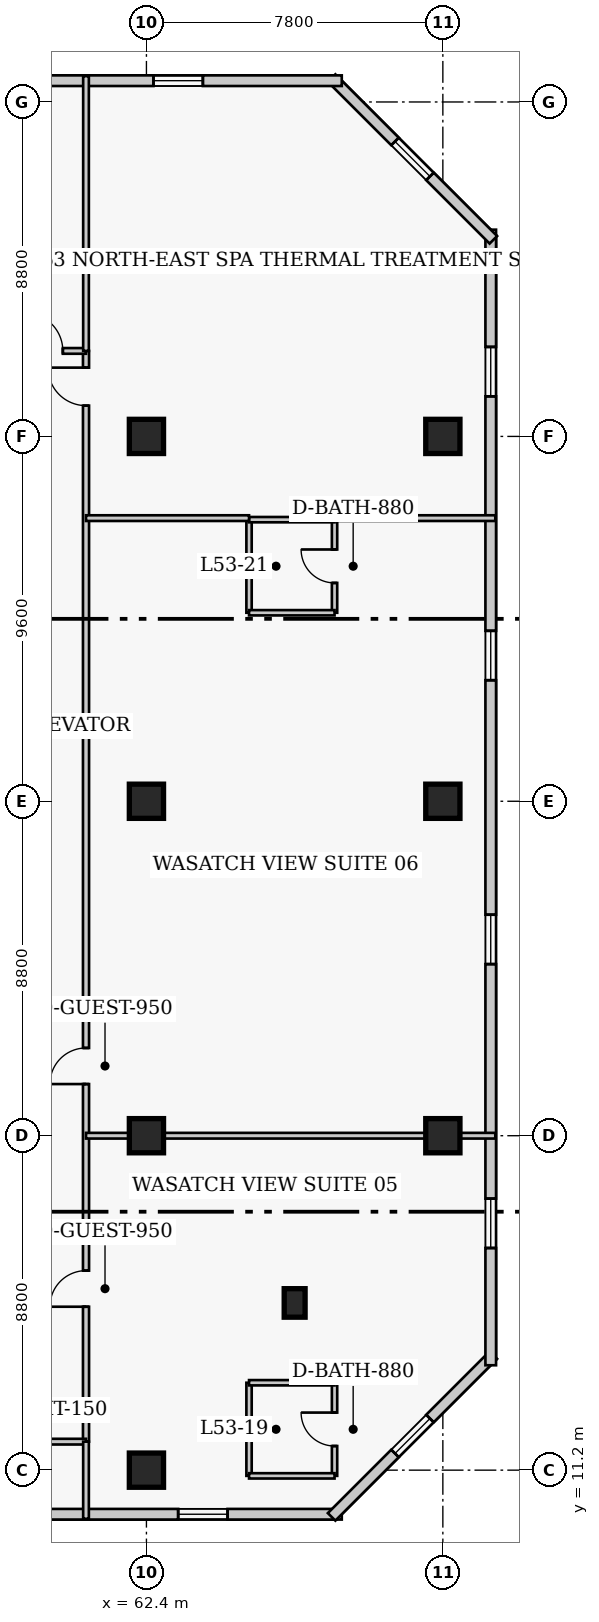
"""IFC4 building model, lengths in metres.
Left out: names, types, materials, properties, quantities, classifications, styles, units other than length and angle.
Written with IfcOpenShell. Run it as: python <this file> out.ifc"""

import sys

from ifc_helpers import new_model, si_unit, direction, frame, frame_2d, origin, origin_2d, place, context, subcontext, project, spatial, rectangle, extrude, element, fill, save


model = new_model("IFC4")
c1 = context("Model", 3, precision=1e-05, world=origin(), true_north=direction((0.0, 1.0)))
c2 = subcontext(c1, "Body", "Model", "MODEL_VIEW")
j1 = project(units=[si_unit("LENGTHUNIT", "METRE"), si_unit("PLANEANGLEUNIT", "RADIAN")], contexts=[c1])
p1 = place(None, origin())
s1 = spatial("IfcSite", under=j1, at=p1, CompositionType="ELEMENT")
p2 = place(p1, origin())
s2 = spatial("IfcBuilding", under=s1, at=p2, CompositionType="ELEMENT")
p3 = place(p2, frame((0.0, 0.0, 212.4)))
s3 = spatial("IfcBuildingStorey", under=s2, at=p3, CompositionType="ELEMENT", Elevation=212.4)
for number, where, z_axis, x_axis in (
    (1, (62.4, 11.2, 0.0), (0.0, 0.0, 1.0), (1.0, 0.0, 0.0)),
    (2, (62.4, 20.0, 0.0), (0.0, 0.0, 1.0), (1.0, 0.0, 0.0)),
    (3, (62.4, 28.8, 0.0), (0.0, 0.0, 1.0), (1.0, 0.0, 0.0)),
    (4, (62.4, 38.4, 0.0), (0.0, 0.0, 1.0), (1.0, 0.0, 0.0)),
    (5, (70.2, 20.0, 0.0), (0.0, 0.0, 1.0), (1.0, 0.0, 0.0)),
    (6, (70.2, 28.8, 0.0), (0.0, 0.0, 1.0), (1.0, 0.0, 0.0)),
    (7, (70.2, 38.4, 0.0), (0.0, 0.0, 1.0), (1.0, 0.0, 0.0)),
):
    element("IfcColumn", number, at=place(p3, frame(where, z_axis=z_axis, x_axis=x_axis)), inside=s3, PredefinedType="COLUMN", context=c2, shape_type="SweptSolid", body=[
        extrude(rectangle(XDim=0.9, YDim=0.9, at=origin_2d()), origin(), (0.0, 0.0, 1.0), 3.9),
    ])
p4 = place(p3, frame((66.3, 15.6, 0.0), z_axis=(0.0, 0.0, 1.0), x_axis=(1.0, 0.0, 0.0)))
e8 = element("IfcColumn", 8, at=p4, inside=s3, PredefinedType="PILASTER", context=c2, shape_type="SweptSolid", body=[
    extrude(rectangle(XDim=0.55, YDim=0.75, at=origin_2d()), origin(), (0.0, 0.0, 1.0), 3.9),
])
p5 = place(p3, frame((41.71, 10.04, 0.0), z_axis=(0.0, 0.0, 1.0), x_axis=(1.0, 0.0, 0.0)))
e9 = element("IfcWall", 9, at=p5, inside=s3, PredefinedType="SOLIDWALL", context=c2, shape_type="SweptSolid", body=[
    extrude(rectangle(XDim=25.83, YDim=0.28, at=frame_2d((12.915, 0.0))), origin(), (0.0, 0.0, 1.0), 3.65),
])
p6 = place(p5, frame((3.005, 0.0, 0.85)))
e10 = element("IfcOpeningElement", 10, at=p6, cuts=e9, PredefinedType="OPENING", context=c2, shape_type="SweptSolid", body=[
    extrude(rectangle(XDim=1.3, YDim=1.7, at=frame_2d((0.65, 0.85))), frame((0.0, 0.15, 0.0), z_axis=(0.0, -1.0, 0.0), x_axis=(1.0, 0.0, 0.0)), (0.0, 0.0, 1.0), 0.3),
])
p7 = place(p5, frame((13.415, 0.0, 0.85)))
e11 = element("IfcOpeningElement", 11, at=p7, cuts=e9, PredefinedType="OPENING", context=c2, shape_type="SweptSolid", body=[
    extrude(rectangle(XDim=1.3, YDim=1.7, at=frame_2d((0.65, 0.85))), frame((0.0, 0.15, 0.0), z_axis=(0.0, -1.0, 0.0), x_axis=(1.0, 0.0, 0.0)), (0.0, 0.0, 1.0), 0.3),
])
p8 = place(p5, frame((21.525, 0.0, 0.85)))
e12 = element("IfcOpeningElement", 12, at=p8, cuts=e9, PredefinedType="OPENING", context=c2, shape_type="SweptSolid", body=[
    extrude(rectangle(XDim=1.3, YDim=1.7, at=frame_2d((0.65, 0.85))), frame((0.0, 0.15, 0.0), z_axis=(0.0, -1.0, 0.0), x_axis=(1.0, 0.0, 0.0)), (0.0, 0.0, 1.0), 0.3),
])
p9 = place(p3, frame((67.273, 9.971, 0.0), z_axis=(0.0, 0.0, 1.0), x_axis=(0.707106781187, 0.707106781187, 0.0)))
e13 = element("IfcWall", 13, at=p9, inside=s3, PredefinedType="SOLIDWALL", context=c2, shape_type="SweptSolid", body=[
    extrude(rectangle(XDim=6.02, YDim=0.28, at=frame_2d((3.01, 0.0))), origin(), (0.0, 0.0, 1.0), 3.65),
])
p10 = place(p9, frame((2.36, 0.0, 0.85)))
e14 = element("IfcOpeningElement", 14, at=p10, cuts=e13, PredefinedType="OPENING", context=c2, shape_type="SweptSolid", body=[
    extrude(rectangle(XDim=1.3, YDim=1.7, at=frame_2d((0.65, 0.85))), frame((0.0, 0.15, 0.0), z_axis=(0.0, -1.0, 0.0), x_axis=(1.0, 0.0, 0.0)), (0.0, 0.0, 1.0), 0.3),
])
p11 = place(p3, frame((71.46, 13.96, 0.0), z_axis=(0.0, 0.0, 1.0), x_axis=(0.0, 1.0, 0.0)))
e15 = element("IfcWall", 15, at=p11, inside=s3, PredefinedType="SOLIDWALL", context=c2, shape_type="SweptSolid", body=[
    extrude(rectangle(XDim=29.88, YDim=0.28, at=frame_2d((14.94, 0.0))), origin(), (0.0, 0.0, 1.0), 3.65),
])
p12 = place(p11, frame((3.085, 0.0, 0.85)))
e16 = element("IfcOpeningElement", 16, at=p12, cuts=e15, PredefinedType="OPENING", context=c2, shape_type="SweptSolid", body=[
    extrude(rectangle(XDim=1.3, YDim=1.7, at=frame_2d((0.65, 0.85))), frame((0.0, 0.15, 0.0), z_axis=(0.0, -1.0, 0.0), x_axis=(1.0, 0.0, 0.0)), (0.0, 0.0, 1.0), 0.3),
])
p13 = place(p11, frame((10.555, 0.0, 0.85)))
e17 = element("IfcOpeningElement", 17, at=p13, cuts=e15, PredefinedType="OPENING", context=c2, shape_type="SweptSolid", body=[
    extrude(rectangle(XDim=1.3, YDim=1.7, at=frame_2d((0.65, 0.85))), frame((0.0, 0.15, 0.0), z_axis=(0.0, -1.0, 0.0), x_axis=(1.0, 0.0, 0.0)), (0.0, 0.0, 1.0), 0.3),
])
p14 = place(p11, frame((18.025, 0.0, 0.85)))
e18 = element("IfcOpeningElement", 18, at=p14, cuts=e15, PredefinedType="OPENING", context=c2, shape_type="SweptSolid", body=[
    extrude(rectangle(XDim=1.3, YDim=1.7, at=frame_2d((0.65, 0.85))), frame((0.0, 0.15, 0.0), z_axis=(0.0, -1.0, 0.0), x_axis=(1.0, 0.0, 0.0)), (0.0, 0.0, 1.0), 0.3),
])
p15 = place(p11, frame((25.495, 0.0, 0.85)))
e19 = element("IfcOpeningElement", 19, at=p15, cuts=e15, PredefinedType="OPENING", context=c2, shape_type="SweptSolid", body=[
    extrude(rectangle(XDim=1.3, YDim=1.7, at=frame_2d((0.65, 0.85))), frame((0.0, 0.15, 0.0), z_axis=(0.0, -1.0, 0.0), x_axis=(1.0, 0.0, 0.0)), (0.0, 0.0, 1.0), 0.3),
])
p16 = place(p3, frame((71.529, 43.573, 0.0), z_axis=(0.0, 0.0, 1.0), x_axis=(-0.707106781187, 0.707106781187, 0.0)))
e20 = element("IfcWall", 20, at=p16, inside=s3, PredefinedType="SOLIDWALL", context=c2, shape_type="SweptSolid", body=[
    extrude(rectangle(XDim=6.02, YDim=0.28, at=frame_2d((3.01, 0.0))), origin(), (0.0, 0.0, 1.0), 3.65),
])
p17 = place(p16, frame((2.36, 0.0, 0.85)))
e21 = element("IfcOpeningElement", 21, at=p17, cuts=e20, PredefinedType="OPENING", context=c2, shape_type="SweptSolid", body=[
    extrude(rectangle(XDim=1.3, YDim=1.7, at=frame_2d((0.65, 0.85))), frame((0.0, 0.15, 0.0), z_axis=(0.0, -1.0, 0.0), x_axis=(1.0, 0.0, 0.0)), (0.0, 0.0, 1.0), 0.3),
])
p18 = place(p3, frame((67.54, 47.76, 0.0), z_axis=(0.0, 0.0, 1.0), x_axis=(-1.0, 0.0, 0.0)))
e22 = element("IfcWall", 22, at=p18, inside=s3, PredefinedType="SOLIDWALL", context=c2, shape_type="SweptSolid", body=[
    extrude(rectangle(XDim=25.83, YDim=0.28, at=frame_2d((12.915, 0.0))), origin(), (0.0, 0.0, 1.0), 3.65),
])
p19 = place(p18, frame((3.655, 0.0, 0.85)))
e23 = element("IfcOpeningElement", 23, at=p19, cuts=e22, PredefinedType="OPENING", context=c2, shape_type="SweptSolid", body=[
    extrude(rectangle(XDim=1.3, YDim=1.7, at=frame_2d((0.65, 0.85))), frame((0.0, 0.15, 0.0), z_axis=(0.0, -1.0, 0.0), x_axis=(1.0, 0.0, 0.0)), (0.0, 0.0, 1.0), 0.3),
])
p20 = place(p18, frame((22.025, 0.0, 0.85)))
e24 = element("IfcOpeningElement", 24, at=p20, cuts=e22, PredefinedType="OPENING", context=c2, shape_type="SweptSolid", body=[
    extrude(rectangle(XDim=1.3, YDim=1.7, at=frame_2d((0.65, 0.85))), frame((0.0, 0.15, 0.0), z_axis=(0.0, -1.0, 0.0), x_axis=(1.0, 0.0, 0.0)), (0.0, 0.0, 1.0), 0.3),
])
p21 = place(p3, frame((60.81, 11.95, 0.0), z_axis=(0.0, 0.0, 1.0), x_axis=(0.0, 1.0, 0.0)))
e25 = element("IfcWall", 25, at=p21, inside=s3, PredefinedType="PARTITIONING", context=c2, shape_type="SweptSolid", body=[
    extrude(rectangle(XDim=28.7, YDim=0.16, at=frame_2d((14.35, 0.0))), origin(), (0.0, 0.0, 1.0), 3.65),
])
p22 = place(p21, frame((3.55, 0.0, 0.0)))
e26 = element("IfcOpeningElement", 26, at=p22, cuts=e25, PredefinedType="OPENING", context=c2, shape_type="SweptSolid", body=[
    extrude(rectangle(XDim=0.95, YDim=2.1, at=frame_2d((0.475, 1.05))), frame((0.0, 0.09, 0.0), z_axis=(0.0, -1.0, 0.0), x_axis=(1.0, 0.0, 0.0)), (0.0, 0.0, 1.0), 0.18),
])
p23 = place(p21, frame((9.409, 0.0, 0.0)))
e27 = element("IfcOpeningElement", 27, at=p23, cuts=e25, PredefinedType="OPENING", context=c2, shape_type="SweptSolid", body=[
    extrude(rectangle(XDim=0.95, YDim=2.1, at=frame_2d((0.475, 1.05))), frame((0.0, 0.09, 0.0), z_axis=(0.0, -1.0, 0.0), x_axis=(1.0, 0.0, 0.0)), (0.0, 0.0, 1.0), 0.18),
])
p24 = place(p21, frame((27.26, 0.0, 0.0)))
e28 = element("IfcOpeningElement", 28, at=p24, cuts=e25, PredefinedType="OPENING", context=c2, shape_type="SweptSolid", body=[
    extrude(rectangle(XDim=1.0, YDim=2.15, at=frame_2d((0.5, 1.075))), frame((0.0, 0.09, 0.0), z_axis=(0.0, -1.0, 0.0), x_axis=(1.0, 0.0, 0.0)), (0.0, 0.0, 1.0), 0.18),
])
p25 = place(p3, frame((58.59, 11.95, 0.0), z_axis=(0.0, 0.0, 1.0), x_axis=(1.0, 0.0, 0.0)))
e29 = element("IfcWall", 29, at=p25, inside=s3, PredefinedType="PARTITIONING", context=c2, shape_type="SweptSolid", body=[
    extrude(rectangle(XDim=2.22, YDim=0.15, at=frame_2d((1.11, 0.0))), origin(), (0.0, 0.0, 1.0), 3.65),
])
p26 = place(p3, frame((56.8, 40.65, 0.0), z_axis=(0.0, 0.0, 1.0), x_axis=(1.0, 0.0, 0.0)))
e30 = element("IfcWall", 30, at=p26, inside=s3, PredefinedType="PARTITIONING", context=c2, shape_type="SweptSolid", body=[
    extrude(rectangle(XDim=4.01, YDim=0.15, at=frame_2d((2.005, 0.0))), origin(), (0.0, 0.0, 1.0), 3.65),
])
p27 = place(p26, frame((2.4, 0.0, 0.0)))
e31 = element("IfcOpeningElement", 31, at=p27, cuts=e30, PredefinedType="OPENING", context=c2, shape_type="SweptSolid", body=[
    extrude(rectangle(XDim=1.0, YDim=2.15, at=frame_2d((0.5, 1.075))), frame((0.0, 0.085, 0.0), z_axis=(0.0, -1.0, 0.0), x_axis=(1.0, 0.0, 0.0)), (0.0, 0.0, 1.0), 0.17),
])
p28 = place(p3, frame((60.81, 40.65, 0.0), z_axis=(0.0, 0.0, 1.0), x_axis=(0.0, 1.0, 0.0)))
e32 = element("IfcWall", 32, at=p28, inside=s3, PredefinedType="PARTITIONING", context=c2, shape_type="SweptSolid", body=[
    extrude(rectangle(XDim=7.23, YDim=0.15, at=frame_2d((3.615, 0.0))), origin(), (0.0, 0.0, 1.0), 3.65),
])
p29 = place(p3, frame((60.81, 9.92, 0.0), z_axis=(0.0, 0.0, 1.0), x_axis=(0.0, 1.0, 0.0)))
e33 = element("IfcWall", 33, at=p29, inside=s3, PredefinedType="PARTITIONING", context=c2, shape_type="SweptSolid", body=[
    extrude(rectangle(XDim=2.03, YDim=0.15, at=frame_2d((1.015, 0.0))), origin(), (0.0, 0.0, 1.0), 3.65),
])
p30 = place(p3, frame((65.1, 11.05, 0.0), z_axis=(0.0, 0.0, 1.0), x_axis=(0.0, 1.0, 0.0)))
e34 = element("IfcWall", 34, at=p30, inside=s3, PredefinedType="PLUMBINGWALL", context=c2, shape_type="SweptSolid", body=[
    extrude(rectangle(XDim=2.45, YDim=0.14, at=frame_2d((1.225, 0.0))), origin(), (0.0, 0.0, 1.0), 3.65),
])
p31 = place(p3, frame((67.35, 11.05, 0.0), z_axis=(0.0, 0.0, 1.0), x_axis=(0.0, 1.0, 0.0)))
e35 = element("IfcWall", 35, at=p31, inside=s3, PredefinedType="PLUMBINGWALL", context=c2, shape_type="SweptSolid", body=[
    extrude(rectangle(XDim=2.45, YDim=0.14, at=frame_2d((1.225, 0.0))), origin(), (0.0, 0.0, 1.0), 3.65),
])
p32 = place(p31, frame((0.785, 0.0, 0.0)))
e36 = element("IfcOpeningElement", 36, at=p32, cuts=e35, PredefinedType="OPENING", context=c2, shape_type="SweptSolid", body=[
    extrude(rectangle(XDim=0.88, YDim=2.05, at=frame_2d((0.44, 1.025))), frame((0.0, 0.08, 0.0), z_axis=(0.0, -1.0, 0.0), x_axis=(1.0, 0.0, 0.0)), (0.0, 0.0, 1.0), 0.16),
])
for number, where, z_axis, x_axis in (
    (37, (65.1, 11.05, 0.0), (0.0, 0.0, 1.0), (1.0, 0.0, 0.0)),
    (38, (65.1, 13.5, 0.0), (0.0, 0.0, 1.0), (1.0, 0.0, 0.0)),
):
    element("IfcWall", number, at=place(p3, frame(where, z_axis=z_axis, x_axis=x_axis)), inside=s3, PredefinedType="PLUMBINGWALL", context=c2, shape_type="SweptSolid", body=[
        extrude(rectangle(XDim=2.25, YDim=0.14, at=frame_2d((1.125, 0.0))), origin(), (0.0, 0.0, 1.0), 3.65),
    ])
p33 = place(p3, frame((60.81, 20.0, 0.0), z_axis=(0.0, 0.0, 1.0), x_axis=(1.0, 0.0, 0.0)))
e39 = element("IfcWall", 39, at=p33, inside=s3, PredefinedType="PARTITIONING", context=c2, shape_type="SweptSolid", body=[
    extrude(rectangle(XDim=10.77, YDim=0.15, at=frame_2d((5.385, 0.0))), origin(), (0.0, 0.0, 1.0), 2.878),
])
p34 = place(p3, frame((65.1, 33.76, 0.0), z_axis=(0.0, 0.0, 1.0), x_axis=(0.0, 1.0, 0.0)))
e40 = element("IfcWall", 40, at=p34, inside=s3, PredefinedType="PLUMBINGWALL", context=c2, shape_type="SweptSolid", body=[
    extrude(rectangle(XDim=2.45, YDim=0.14, at=frame_2d((1.225, 0.0))), origin(), (0.0, 0.0, 1.0), 3.65),
])
p35 = place(p3, frame((67.35, 33.76, 0.0), z_axis=(0.0, 0.0, 1.0), x_axis=(0.0, 1.0, 0.0)))
e41 = element("IfcWall", 41, at=p35, inside=s3, PredefinedType="PLUMBINGWALL", context=c2, shape_type="SweptSolid", body=[
    extrude(rectangle(XDim=2.45, YDim=0.14, at=frame_2d((1.225, 0.0))), origin(), (0.0, 0.0, 1.0), 3.65),
])
p36 = place(p35, frame((0.785, 0.0, 0.0)))
e42 = element("IfcOpeningElement", 42, at=p36, cuts=e41, PredefinedType="OPENING", context=c2, shape_type="SweptSolid", body=[
    extrude(rectangle(XDim=0.88, YDim=2.05, at=frame_2d((0.44, 1.025))), frame((0.0, 0.08, 0.0), z_axis=(0.0, -1.0, 0.0), x_axis=(1.0, 0.0, 0.0)), (0.0, 0.0, 1.0), 0.16),
])
for number, where, z_axis, x_axis in (
    (43, (65.1, 33.76, 0.0), (0.0, 0.0, 1.0), (1.0, 0.0, 0.0)),
    (44, (65.1, 36.21, 0.0), (0.0, 0.0, 1.0), (1.0, 0.0, 0.0)),
):
    element("IfcWall", number, at=place(p3, frame(where, z_axis=z_axis, x_axis=x_axis)), inside=s3, PredefinedType="PLUMBINGWALL", context=c2, shape_type="SweptSolid", body=[
        extrude(rectangle(XDim=2.25, YDim=0.14, at=frame_2d((1.125, 0.0))), origin(), (0.0, 0.0, 1.0), 3.65),
    ])
p37 = place(p3, frame((60.81, 36.25, 0.0), z_axis=(0.0, 0.0, 1.0), x_axis=(1.0, 0.0, 0.0)))
e45 = element("IfcWall", 45, at=p37, inside=s3, PredefinedType="PARTITIONING", context=c2, shape_type="SweptSolid", body=[
    extrude(rectangle(XDim=4.29, YDim=0.15, at=frame_2d((2.145, 0.0))), origin(), (0.0, 0.0, 1.0), 3.65),
])
p38 = place(p3, frame((67.35, 36.25, 0.0), z_axis=(0.0, 0.0, 1.0), x_axis=(1.0, 0.0, 0.0)))
e46 = element("IfcWall", 46, at=p38, inside=s3, PredefinedType="PARTITIONING", context=c2, shape_type="SweptSolid", body=[
    extrude(rectangle(XDim=4.23, YDim=0.15, at=frame_2d((2.115, 0.0))), origin(), (0.0, 0.0, 1.0), 3.65),
])
p39 = place(p8, origin())
e47 = element("IfcWindow", 47, at=p39, inside=s3, PartitioningType="SINGLE_PANEL", PredefinedType="WINDOW", context=c2, shape_type="SweptSolid", body=[
    extrude(rectangle(XDim=1.3, YDim=1.7, at=frame_2d((0.65, 0.85))), frame((0.0, 0.03, 0.0), z_axis=(0.0, -1.0, 0.0), x_axis=(1.0, 0.0, 0.0)), (0.0, 0.0, 1.0), 0.06),
])
fill(e12, e47)
p40 = place(p10, origin())
e48 = element("IfcWindow", 48, at=p40, inside=s3, PartitioningType="SINGLE_PANEL", PredefinedType="WINDOW", context=c2, shape_type="SweptSolid", body=[
    extrude(rectangle(XDim=1.3, YDim=1.7, at=frame_2d((0.65, 0.85))), frame((0.0, 0.03, 0.0), z_axis=(0.0, -1.0, 0.0), x_axis=(1.0, 0.0, 0.0)), (0.0, 0.0, 1.0), 0.06),
])
fill(e14, e48)
p41 = place(p12, origin())
e49 = element("IfcWindow", 49, at=p41, inside=s3, PartitioningType="SINGLE_PANEL", PredefinedType="WINDOW", context=c2, shape_type="SweptSolid", body=[
    extrude(rectangle(XDim=1.3, YDim=1.7, at=frame_2d((0.65, 0.85))), frame((0.0, 0.03, 0.0), z_axis=(0.0, -1.0, 0.0), x_axis=(1.0, 0.0, 0.0)), (0.0, 0.0, 1.0), 0.06),
])
fill(e16, e49)
p42 = place(p13, origin())
e50 = element("IfcWindow", 50, at=p42, inside=s3, PartitioningType="SINGLE_PANEL", PredefinedType="WINDOW", context=c2, shape_type="SweptSolid", body=[
    extrude(rectangle(XDim=1.3, YDim=1.7, at=frame_2d((0.65, 0.85))), frame((0.0, 0.03, 0.0), z_axis=(0.0, -1.0, 0.0), x_axis=(1.0, 0.0, 0.0)), (0.0, 0.0, 1.0), 0.06),
])
fill(e17, e50)
p43 = place(p14, origin())
e51 = element("IfcWindow", 51, at=p43, inside=s3, PartitioningType="SINGLE_PANEL", PredefinedType="WINDOW", context=c2, shape_type="SweptSolid", body=[
    extrude(rectangle(XDim=1.3, YDim=1.7, at=frame_2d((0.65, 0.85))), frame((0.0, 0.03, 0.0), z_axis=(0.0, -1.0, 0.0), x_axis=(1.0, 0.0, 0.0)), (0.0, 0.0, 1.0), 0.06),
])
fill(e18, e51)
p44 = place(p15, origin())
e52 = element("IfcWindow", 52, at=p44, inside=s3, PartitioningType="SINGLE_PANEL", PredefinedType="WINDOW", context=c2, shape_type="SweptSolid", body=[
    extrude(rectangle(XDim=1.3, YDim=1.7, at=frame_2d((0.65, 0.85))), frame((0.0, 0.03, 0.0), z_axis=(0.0, -1.0, 0.0), x_axis=(1.0, 0.0, 0.0)), (0.0, 0.0, 1.0), 0.06),
])
fill(e19, e52)
p45 = place(p17, origin())
e53 = element("IfcWindow", 53, at=p45, inside=s3, PartitioningType="SINGLE_PANEL", PredefinedType="WINDOW", context=c2, shape_type="SweptSolid", body=[
    extrude(rectangle(XDim=1.3, YDim=1.7, at=frame_2d((0.65, 0.85))), frame((0.0, 0.03, 0.0), z_axis=(0.0, -1.0, 0.0), x_axis=(1.0, 0.0, 0.0)), (0.0, 0.0, 1.0), 0.06),
])
fill(e21, e53)
p46 = place(p19, origin())
e54 = element("IfcWindow", 54, at=p46, inside=s3, PartitioningType="SINGLE_PANEL", PredefinedType="WINDOW", context=c2, shape_type="SweptSolid", body=[
    extrude(rectangle(XDim=1.3, YDim=1.7, at=frame_2d((0.65, 0.85))), frame((0.0, 0.03, 0.0), z_axis=(0.0, -1.0, 0.0), x_axis=(1.0, 0.0, 0.0)), (0.0, 0.0, 1.0), 0.06),
])
fill(e23, e54)
p47 = place(p27, origin())
e55 = element("IfcDoor", 55, at=p47, inside=s3, OperationType="SINGLE_SWING_LEFT", PredefinedType="DOOR", context=c2, shape_type="SweptSolid", body=[
    extrude(rectangle(XDim=1.0, YDim=2.15, at=frame_2d((0.5, 1.075))), frame((0.0, 0.025, 0.0), z_axis=(0.0, -1.0, 0.0), x_axis=(1.0, 0.0, 0.0)), (0.0, 0.0, 1.0), 0.05),
])
fill(e31, e55)
p48 = place(p32, origin())
e56 = element("IfcDoor", 56, at=p48, inside=s3, OperationType="SINGLE_SWING_RIGHT", PredefinedType="DOOR", context=c2, shape_type="SweptSolid", body=[
    extrude(rectangle(XDim=0.88, YDim=2.05, at=frame_2d((0.44, 1.025))), frame((0.0, 0.025, 0.0), z_axis=(0.0, -1.0, 0.0), x_axis=(1.0, 0.0, 0.0)), (0.0, 0.0, 1.0), 0.05),
])
fill(e36, e56)
p49 = place(p22, origin())
e57 = element("IfcDoor", 57, at=p49, inside=s3, OperationType="SINGLE_SWING_LEFT", PredefinedType="DOOR", context=c2, shape_type="SweptSolid", body=[
    extrude(rectangle(XDim=0.95, YDim=2.1, at=frame_2d((0.475, 1.05))), frame((0.0, 0.025, 0.0), z_axis=(0.0, -1.0, 0.0), x_axis=(1.0, 0.0, 0.0)), (0.0, 0.0, 1.0), 0.05),
])
fill(e26, e57)
p50 = place(p36, origin())
e58 = element("IfcDoor", 58, at=p50, inside=s3, OperationType="SINGLE_SWING_RIGHT", PredefinedType="DOOR", context=c2, shape_type="SweptSolid", body=[
    extrude(rectangle(XDim=0.88, YDim=2.05, at=frame_2d((0.44, 1.025))), frame((0.0, 0.025, 0.0), z_axis=(0.0, -1.0, 0.0), x_axis=(1.0, 0.0, 0.0)), (0.0, 0.0, 1.0), 0.05),
])
fill(e42, e58)
p51 = place(p23, origin())
e59 = element("IfcDoor", 59, at=p51, inside=s3, OperationType="SINGLE_SWING_LEFT", PredefinedType="DOOR", context=c2, shape_type="SweptSolid", body=[
    extrude(rectangle(XDim=0.95, YDim=2.1, at=frame_2d((0.475, 1.05))), frame((0.0, 0.025, 0.0), z_axis=(0.0, -1.0, 0.0), x_axis=(1.0, 0.0, 0.0)), (0.0, 0.0, 1.0), 0.05),
])
fill(e27, e59)
p52 = place(p24, origin())
e60 = element("IfcDoor", 60, at=p52, inside=s3, OperationType="SINGLE_SWING_RIGHT", PredefinedType="DOOR", context=c2, shape_type="SweptSolid", body=[
    extrude(rectangle(XDim=1.0, YDim=2.15, at=frame_2d((0.5, 1.075))), frame((0.0, 0.025, 0.0), z_axis=(0.0, -1.0, 0.0), x_axis=(1.0, 0.0, 0.0)), (0.0, 0.0, 1.0), 0.05),
])
fill(e28, e60)
save(model, sys.argv[1])
